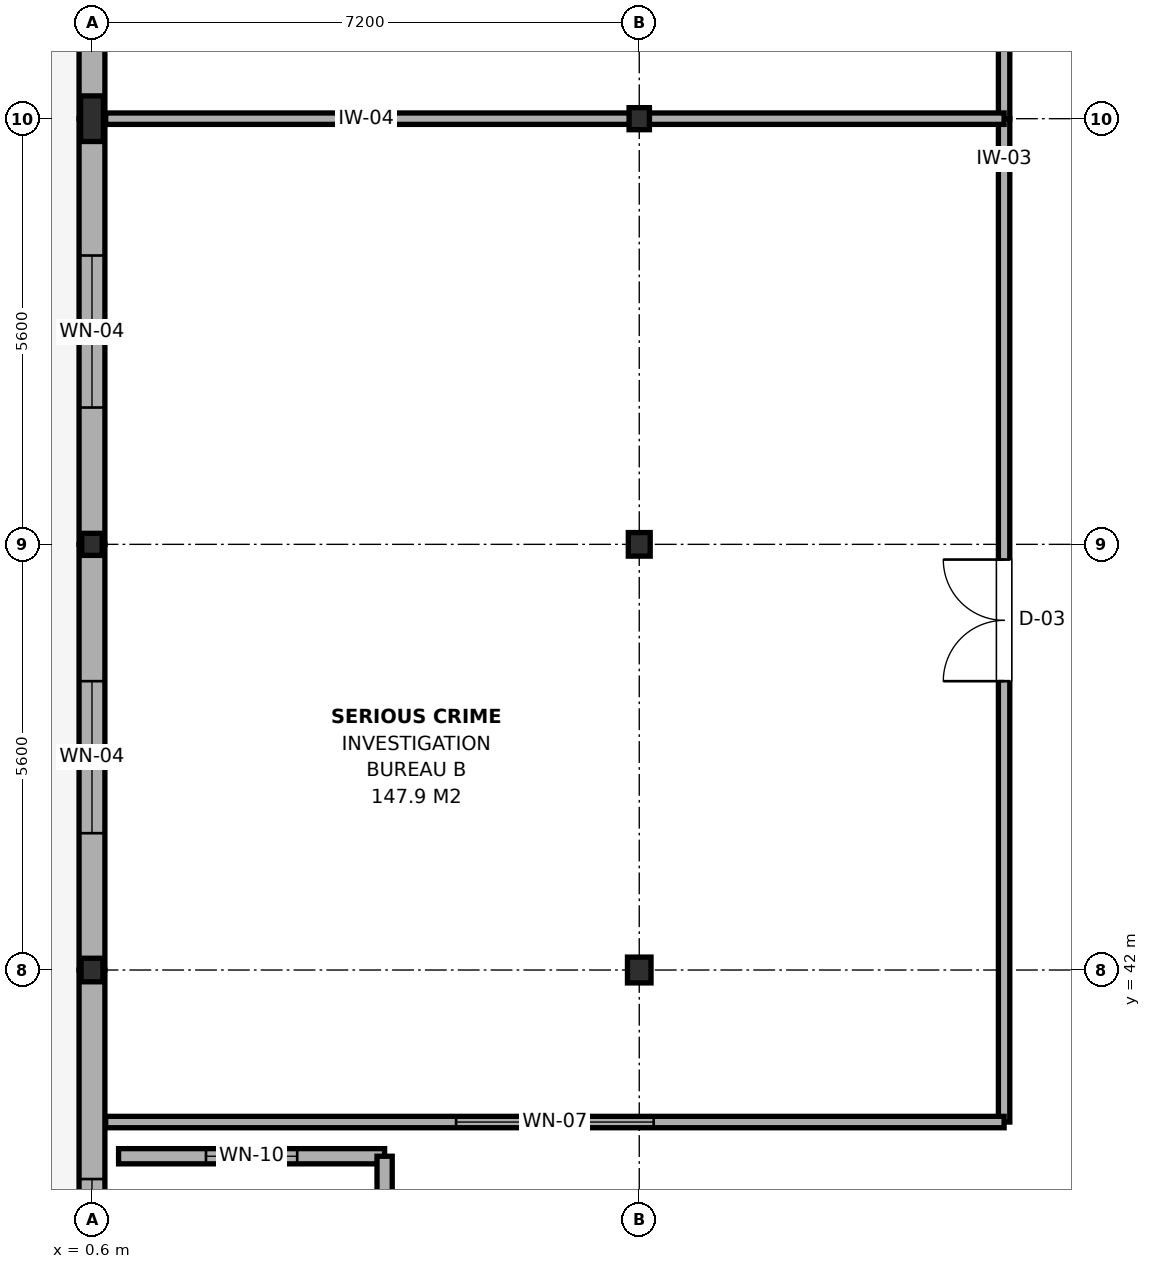
"""IFC4 building model, lengths in metres.
Left out: names, types, materials, properties, quantities, classifications, styles, units other than length and angle.
Written with IfcOpenShell. Run it as: python <this file> out.ifc"""

import sys

from ifc_helpers import new_model, si_unit, direction, frame, frame_2d, origin, origin_2d, place, context, subcontext, project, spatial, rectangle, i_section, extrude, element, fill, save


model = new_model("IFC4")
c1 = context("Model", 3, precision=1e-05, world=origin(), true_north=direction((0.0, 1.0)))
c2 = subcontext(c1, "Body", "Model", "MODEL_VIEW")
j1 = project(units=[si_unit("LENGTHUNIT", "METRE"), si_unit("PLANEANGLEUNIT", "RADIAN")], contexts=[c1])
p1 = place(None, origin())
s1 = spatial("IfcSite", under=j1, at=p1, CompositionType="ELEMENT")
p2 = place(p1, origin())
s2 = spatial("IfcBuilding", under=s1, at=p2, CompositionType="ELEMENT")
p3 = place(p2, frame((0.0, 0.0, 13.2)))
s3 = spatial("IfcBuildingStorey", under=s2, at=p3, CompositionType="ELEMENT", Elevation=13.2)
p4 = place(p3, frame((0.6, 42.0, 0.0), z_axis=(0.0, 0.0, 1.0), x_axis=(1.0, 0.0, 0.0)))
e1 = element("IfcColumn", 1, at=p4, inside=s3, PredefinedType="COLUMN", context=c2, shape_type="SweptSolid", body=[
    extrude(i_section(OverallWidth=0.288, OverallDepth=0.31, WebThickness=0.019, FlangeThickness=0.033, FilletRadius=0.024, at=origin_2d()), origin(), (0.0, 0.0, 1.0), 3.9),
])
p5 = place(p3, frame((0.6, 47.6, 0.0), z_axis=(0.0, 0.0, 1.0), x_axis=(1.0, 0.0, 0.0)))
e2 = element("IfcColumn", 2, at=p5, inside=s3, PredefinedType="COLUMN", context=c2, shape_type="SweptSolid", body=[
    extrude(i_section(OverallWidth=0.268, OverallDepth=0.29, WebThickness=0.018, FlangeThickness=0.032, FilletRadius=0.024, at=origin_2d()), origin(), (0.0, 0.0, 1.0), 3.9),
])
p6 = place(p3, frame((0.6, 53.2, 0.0), z_axis=(0.0, 0.0, 1.0), x_axis=(1.0, 0.0, 0.0)))
e3 = element("IfcColumn", 3, at=p6, inside=s3, PredefinedType="COLUMN", context=c2, shape_type="SweptSolid", body=[
    extrude(i_section(OverallWidth=0.3, OverallDepth=0.6, WebThickness=0.015, FlangeThickness=0.03, FilletRadius=0.027, at=origin_2d()), origin(), (0.0, 0.0, 1.0), 3.9),
])
p7 = place(p3, frame((7.8, 42.0, 0.0), z_axis=(0.0, 0.0, 1.0), x_axis=(1.0, 0.0, 0.0)))
e4 = element("IfcColumn", 4, at=p7, inside=s3, PredefinedType="COLUMN", context=c2, shape_type="SweptSolid", body=[
    extrude(i_section(OverallWidth=0.31, OverallDepth=0.34, WebThickness=0.021, FlangeThickness=0.039, FilletRadius=0.027, at=origin_2d()), origin(), (0.0, 0.0, 1.0), 3.9),
])
p8 = place(p3, frame((7.8, 47.6, 0.0), z_axis=(0.0, 0.0, 1.0), x_axis=(1.0, 0.0, 0.0)))
e5 = element("IfcColumn", 5, at=p8, inside=s3, PredefinedType="COLUMN", context=c2, shape_type="SweptSolid", body=[
    extrude(i_section(OverallWidth=0.288, OverallDepth=0.31, WebThickness=0.019, FlangeThickness=0.033, FilletRadius=0.024, at=origin_2d()), origin(), (0.0, 0.0, 1.0), 3.9),
])
p9 = place(p3, frame((7.8, 53.2, 0.0), z_axis=(0.0, 0.0, 1.0), x_axis=(1.0, 0.0, 0.0)))
e6 = element("IfcColumn", 6, at=p9, inside=s3, PredefinedType="COLUMN", context=c2, shape_type="SweptSolid", body=[
    extrude(i_section(OverallWidth=0.268, OverallDepth=0.29, WebThickness=0.018, FlangeThickness=0.032, FilletRadius=0.024, at=origin_2d()), origin(), (0.0, 0.0, 1.0), 3.9),
])
p10 = place(p3, frame((0.6, 36.4, 0.0), z_axis=(0.0, 0.0, 1.0), x_axis=(0.0, 1.0, 0.0)))
e7 = element("IfcWall", 7, at=p10, inside=s3, PredefinedType="SOLIDWALL", context=c2, shape_type="SweptSolid", body=[
    extrude(rectangle(XDim=5.6, YDim=0.34, at=frame_2d((2.8, 0.0))), origin(), (0.0, 0.0, 1.0), 3.245),
])
p11 = place(p10, frame((0.85, 0.0, 0.9)))
e8 = element("IfcOpeningElement", 8, at=p11, cuts=e7, PredefinedType="OPENING", context=c2, shape_type="SweptSolid", body=[
    extrude(rectangle(XDim=2.0, YDim=1.8, at=frame_2d((1.0, 0.9))), frame((0.0, 0.185, 0.0), z_axis=(0.0, -1.0, 0.0), x_axis=(1.0, 0.0, 0.0)), (0.0, 0.0, 1.0), 0.37),
])
p12 = place(p3, frame((0.6, 42.0, 0.0), z_axis=(0.0, 0.0, 1.0), x_axis=(0.0, 1.0, 0.0)))
e9 = element("IfcWall", 9, at=p12, inside=s3, PredefinedType="SOLIDWALL", context=c2, shape_type="SweptSolid", body=[
    extrude(rectangle(XDim=5.6, YDim=0.34, at=frame_2d((2.8, 0.0))), origin(), (0.0, 0.0, 1.0), 3.095),
])
p13 = place(p12, frame((1.8, 0.0, 0.9)))
e10 = element("IfcOpeningElement", 10, at=p13, cuts=e9, PredefinedType="OPENING", context=c2, shape_type="SweptSolid", body=[
    extrude(rectangle(XDim=2.0, YDim=1.8, at=frame_2d((1.0, 0.9))), frame((0.0, 0.185, 0.0), z_axis=(0.0, -1.0, 0.0), x_axis=(1.0, 0.0, 0.0)), (0.0, 0.0, 1.0), 0.37),
])
p14 = place(p3, frame((0.6, 47.6, 0.0), z_axis=(0.0, 0.0, 1.0), x_axis=(0.0, 1.0, 0.0)))
e11 = element("IfcWall", 11, at=p14, inside=s3, PredefinedType="SOLIDWALL", context=c2, shape_type="SweptSolid", body=[
    extrude(rectangle(XDim=5.6, YDim=0.34, at=frame_2d((2.8, 0.0))), origin(), (0.0, 0.0, 1.0), 3.095),
])
p15 = place(p14, frame((1.8, 0.0, 0.9)))
e12 = element("IfcOpeningElement", 12, at=p15, cuts=e11, PredefinedType="OPENING", context=c2, shape_type="SweptSolid", body=[
    extrude(rectangle(XDim=2.0, YDim=1.8, at=frame_2d((1.0, 0.9))), frame((0.0, 0.185, 0.0), z_axis=(0.0, -1.0, 0.0), x_axis=(1.0, 0.0, 0.0)), (0.0, 0.0, 1.0), 0.37),
])
p16 = place(p3, frame((0.6, 53.2, 0.0), z_axis=(0.0, 0.0, 1.0), x_axis=(0.0, 1.0, 0.0)))
e13 = element("IfcWall", 13, at=p16, inside=s3, PredefinedType="SOLIDWALL", context=c2, shape_type="SweptSolid", body=[
    extrude(rectangle(XDim=5.6, YDim=0.34, at=frame_2d((2.8, 0.0))), origin(), (0.0, 0.0, 1.0), 3.145),
])
p17 = place(p16, frame((1.8, 0.0, 0.9)))
e14 = element("IfcOpeningElement", 14, at=p17, cuts=e13, PredefinedType="OPENING", context=c2, shape_type="SweptSolid", body=[
    extrude(rectangle(XDim=2.0, YDim=1.8, at=frame_2d((1.0, 0.9))), frame((0.0, 0.185, 0.0), z_axis=(0.0, -1.0, 0.0), x_axis=(1.0, 0.0, 0.0)), (0.0, 0.0, 1.0), 0.37),
])
p18 = place(p3, frame((0.95, 39.55, 0.0), z_axis=(0.0, 0.0, 1.0), x_axis=(1.0, 0.0, 0.0)))
e15 = element("IfcWall", 15, at=p18, inside=s3, PredefinedType="PARTITIONING", context=c2, shape_type="SweptSolid", body=[
    extrude(rectangle(XDim=3.5, YDim=0.2, at=frame_2d((1.75, 0.0))), origin(), (0.0, 0.0, 1.0), 3.695),
])
p19 = place(p18, frame((1.15, 0.0, 0.95)))
e16 = element("IfcOpeningElement", 16, at=p19, cuts=e15, PredefinedType="OPENING", context=c2, shape_type="SweptSolid", body=[
    extrude(rectangle(XDim=1.2, YDim=1.5, at=frame_2d((0.6, 0.75))), frame((0.0, 0.115, 0.0), z_axis=(0.0, -1.0, 0.0), x_axis=(1.0, 0.0, 0.0)), (0.0, 0.0, 1.0), 0.23),
])
p20 = place(p3, frame((4.45, 36.15, 0.0), z_axis=(0.0, 0.0, 1.0), x_axis=(0.0, 1.0, 0.0)))
e17 = element("IfcWall", 17, at=p20, inside=s3, PredefinedType="PARTITIONING", context=c2, shape_type="SweptSolid", body=[
    extrude(rectangle(XDim=3.4, YDim=0.2, at=frame_2d((1.7, 0.0))), origin(), (0.0, 0.0, 1.0), 3.345),
])
p21 = place(p20, frame((1.15, 0.0, 0.0)))
e18 = element("IfcOpeningElement", 18, at=p21, cuts=e17, PredefinedType="OPENING", context=c2, shape_type="SweptSolid", body=[
    extrude(rectangle(XDim=1.1, YDim=2.15, at=frame_2d((0.55, 1.075))), frame((0.0, 0.115, 0.0), z_axis=(0.0, -1.0, 0.0), x_axis=(1.0, 0.0, 0.0)), (0.0, 0.0, 1.0), 0.23),
])
p22 = place(p3, frame((12.6, 40.0, 0.0), z_axis=(0.0, 0.0, 1.0), x_axis=(0.0, 1.0, 0.0)))
e19 = element("IfcWall", 19, at=p22, inside=s3, PredefinedType="PARTITIONING", context=c2, shape_type="SweptSolid", body=[
    extrude(rectangle(XDim=13.2, YDim=0.15, at=frame_2d((6.6, 0.0))), origin(), (0.0, 0.0, 1.0), 3.195),
])
p23 = place(p22, frame((5.8, 0.0, 0.0)))
e20 = element("IfcOpeningElement", 20, at=p23, cuts=e19, PredefinedType="OPENING", context=c2, shape_type="SweptSolid", body=[
    extrude(rectangle(XDim=1.6, YDim=2.15, at=frame_2d((0.8, 1.075))), frame((0.0, 0.09, 0.0), z_axis=(0.0, -1.0, 0.0), x_axis=(1.0, 0.0, 0.0)), (0.0, 0.0, 1.0), 0.18),
])
p24 = place(p3, frame((0.78, 40.0, 0.0), z_axis=(0.0, 0.0, 1.0), x_axis=(1.0, 0.0, 0.0)))
e21 = element("IfcWall", 21, at=p24, inside=s3, PredefinedType="PARTITIONING", context=c2, shape_type="SweptSolid", body=[
    extrude(rectangle(XDim=11.82, YDim=0.15, at=frame_2d((5.91, 0.0))), origin(), (0.0, 0.0, 1.0), 3.195),
])
p25 = place(p24, frame((4.61, 0.0, 0.95)))
e22 = element("IfcOpeningElement", 22, at=p25, cuts=e21, PredefinedType="OPENING", context=c2, shape_type="SweptSolid", body=[
    extrude(rectangle(XDim=2.6, YDim=1.5, at=frame_2d((1.3, 0.75))), frame((0.0, 0.09, 0.0), z_axis=(0.0, -1.0, 0.0), x_axis=(1.0, 0.0, 0.0)), (0.0, 0.0, 1.0), 0.18),
])
p26 = place(p3, frame((12.6, 53.2, 0.0), z_axis=(0.0, 0.0, 1.0), x_axis=(0.0, 1.0, 0.0)))
e23 = element("IfcWall", 23, at=p26, inside=s3, PredefinedType="PARTITIONING", context=c2, shape_type="SweptSolid", body=[
    extrude(rectangle(XDim=13.4, YDim=0.15, at=frame_2d((6.7, 0.0))), origin(), (0.0, 0.0, 1.0), 3.145),
])
p27 = place(p26, frame((6.175, 0.0, 0.0)))
e24 = element("IfcOpeningElement", 24, at=p27, cuts=e23, PredefinedType="OPENING", context=c2, shape_type="SweptSolid", body=[
    extrude(rectangle(XDim=1.05, YDim=2.15, at=frame_2d((0.525, 1.075))), frame((0.0, 0.09, 0.0), z_axis=(0.0, -1.0, 0.0), x_axis=(1.0, 0.0, 0.0)), (0.0, 0.0, 1.0), 0.18),
])
p28 = place(p26, frame((8.348, 0.0, 0.95)))
e25 = element("IfcOpeningElement", 25, at=p28, cuts=e23, PredefinedType="OPENING", context=c2, shape_type="SweptSolid", body=[
    extrude(rectangle(XDim=2.6, YDim=1.5, at=frame_2d((1.3, 0.75))), frame((0.0, 0.09, 0.0), z_axis=(0.0, -1.0, 0.0), x_axis=(1.0, 0.0, 0.0)), (0.0, 0.0, 1.0), 0.18),
])
p29 = place(p3, frame((0.78, 53.2, 0.0), z_axis=(0.0, 0.0, 1.0), x_axis=(1.0, 0.0, 0.0)))
e26 = element("IfcWall", 26, at=p29, inside=s3, PredefinedType="PARTITIONING", context=c2, shape_type="SweptSolid", body=[
    extrude(rectangle(XDim=11.82, YDim=0.15, at=frame_2d((5.91, 0.0))), origin(), (0.0, 0.0, 1.0), 3.145),
])
p30 = place(p11, origin())
e27 = element("IfcWindow", 27, at=p30, inside=s3, PartitioningType="SINGLE_PANEL", PredefinedType="WINDOW", context=c2, shape_type="SweptSolid", body=[
    extrude(rectangle(XDim=2.0, YDim=1.8, at=frame_2d((1.0, 0.9))), frame((0.0, 0.03, 0.0), z_axis=(0.0, -1.0, 0.0), x_axis=(1.0, 0.0, 0.0)), (0.0, 0.0, 1.0), 0.06),
])
fill(e8, e27)
p31 = place(p13, origin())
e28 = element("IfcWindow", 28, at=p31, inside=s3, PartitioningType="SINGLE_PANEL", PredefinedType="WINDOW", context=c2, shape_type="SweptSolid", body=[
    extrude(rectangle(XDim=2.0, YDim=1.8, at=frame_2d((1.0, 0.9))), frame((0.0, 0.03, 0.0), z_axis=(0.0, -1.0, 0.0), x_axis=(1.0, 0.0, 0.0)), (0.0, 0.0, 1.0), 0.06),
])
fill(e10, e28)
p32 = place(p15, origin())
e29 = element("IfcWindow", 29, at=p32, inside=s3, PartitioningType="SINGLE_PANEL", PredefinedType="WINDOW", context=c2, shape_type="SweptSolid", body=[
    extrude(rectangle(XDim=2.0, YDim=1.8, at=frame_2d((1.0, 0.9))), frame((0.0, 0.03, 0.0), z_axis=(0.0, -1.0, 0.0), x_axis=(1.0, 0.0, 0.0)), (0.0, 0.0, 1.0), 0.06),
])
fill(e12, e29)
p33 = place(p19, origin())
e30 = element("IfcWindow", 30, at=p33, inside=s3, PartitioningType="SINGLE_PANEL", PredefinedType="WINDOW", context=c2, shape_type="SweptSolid", body=[
    extrude(rectangle(XDim=1.2, YDim=1.5, at=frame_2d((0.6, 0.75))), frame((0.0, 0.03, 0.0), z_axis=(0.0, -1.0, 0.0), x_axis=(1.0, 0.0, 0.0)), (0.0, 0.0, 1.0), 0.06),
])
fill(e16, e30)
p34 = place(p23, origin())
e31 = element("IfcDoor", 31, at=p34, inside=s3, OperationType="DOUBLE_DOOR_SINGLE_SWING", PredefinedType="DOOR", context=c2, shape_type="SweptSolid", body=[
    extrude(rectangle(XDim=1.6, YDim=2.15, at=frame_2d((0.8, 1.075))), frame((0.0, 0.025, 0.0), z_axis=(0.0, -1.0, 0.0), x_axis=(1.0, 0.0, 0.0)), (0.0, 0.0, 1.0), 0.05),
])
fill(e20, e31)
p35 = place(p25, origin())
e32 = element("IfcWindow", 32, at=p35, inside=s3, PartitioningType="SINGLE_PANEL", PredefinedType="WINDOW", context=c2, shape_type="SweptSolid", body=[
    extrude(rectangle(XDim=2.6, YDim=1.5, at=frame_2d((1.3, 0.75))), frame((0.0, 0.03, 0.0), z_axis=(0.0, -1.0, 0.0), x_axis=(1.0, 0.0, 0.0)), (0.0, 0.0, 1.0), 0.06),
])
fill(e22, e32)
save(model, sys.argv[1])
